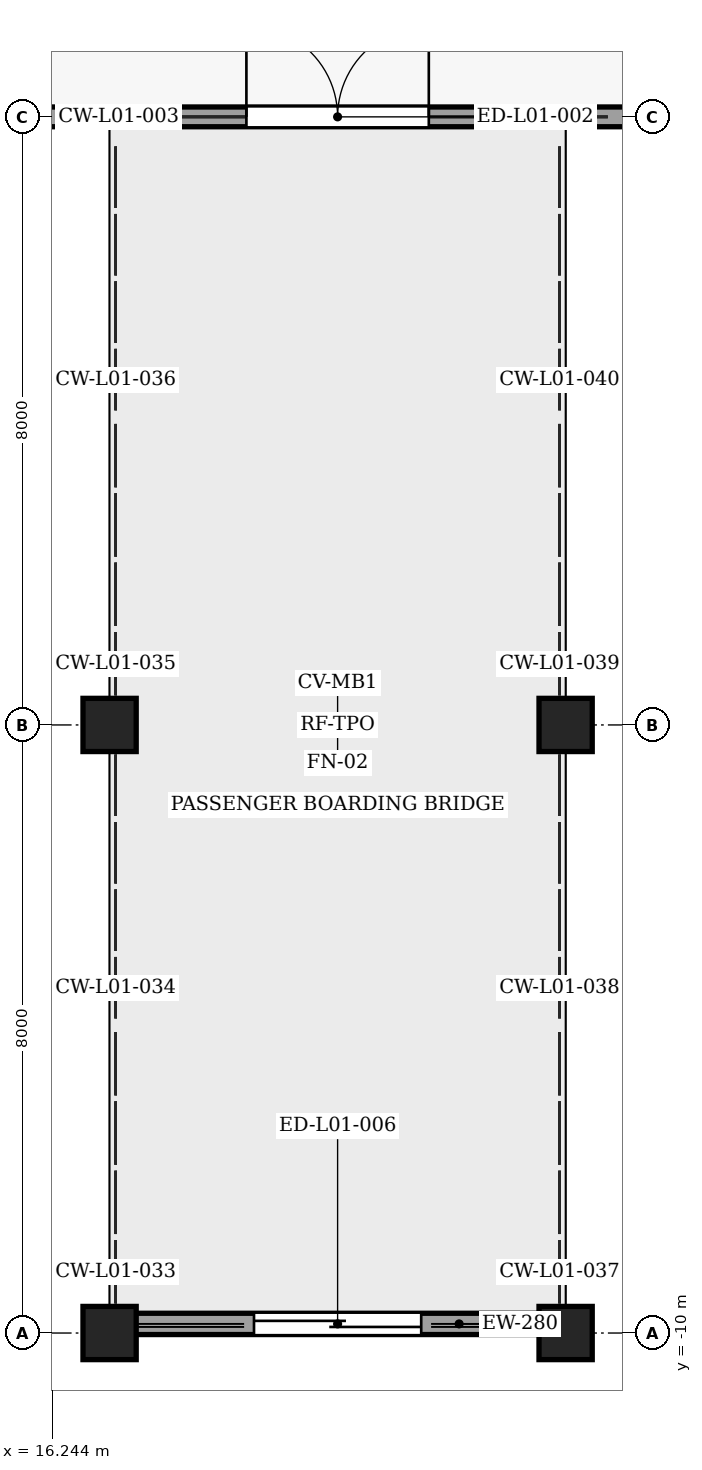
"""IFC4 building model, lengths in metres.
Left out: names, types, materials, properties, quantities, classifications, styles, units other than length and angle.
Written with IfcOpenShell. Run it as: python <this file> out.ifc"""

import sys

from ifc_helpers import new_model, si_unit, direction, frame, frame_2d, origin, origin_2d, place, context, subcontext, project, spatial, rectangle, extrude, element, fill, save


model = new_model("IFC4")
c1 = context("Model", 3, precision=1e-05, world=origin(), true_north=direction((0.0, 1.0)))
c2 = subcontext(c1, "Body", "Model", "MODEL_VIEW")
j1 = project(units=[si_unit("LENGTHUNIT", "METRE"), si_unit("PLANEANGLEUNIT", "RADIAN")], contexts=[c1])
p1 = place(None, origin())
s1 = spatial("IfcSite", under=j1, at=p1, CompositionType="ELEMENT")
p2 = place(p1, origin())
s2 = spatial("IfcBuilding", under=s1, at=p2, CompositionType="ELEMENT")
p3 = place(p2, origin())
s3 = spatial("IfcBuildingStorey", under=s2, at=p3, CompositionType="ELEMENT", Elevation=0.0)
for number, where, z_axis, x_axis in (
    (1, (17.0, -10.0, -0.45), (0.0, 0.0, 1.0), (1.0, 0.0, 0.0)),
    (2, (23.0, -10.0, -0.45), (0.0, 0.0, 1.0), (1.0, 0.0, 0.0)),
    (3, (17.0, -2.0, -0.45), (0.0, 0.0, 1.0), (1.0, 0.0, 0.0)),
    (4, (23.0, -2.0, -0.45), (0.0, 0.0, 1.0), (1.0, 0.0, 0.0)),
):
    element("IfcColumn", number, at=place(p3, frame(where, z_axis=z_axis, x_axis=x_axis)), inside=s3, PredefinedType="COLUMN", context=c2, shape_type="SweptSolid", body=[
        extrude(rectangle(XDim=0.7, YDim=0.7, at=origin_2d()), origin(), (0.0, 0.0, 1.0), 4.58),
    ])
p4 = place(p3, frame((16.172, 6.0, 0.0), z_axis=(0.0, 0.0, 1.0), x_axis=(1.0, 0.0, 0.0)))
e5 = element("IfcWall", 5, at=p4, inside=s3, PredefinedType="SOLIDWALL", context=c2, shape_type="SweptSolid", body=[
    extrude(rectangle(XDim=7.657, YDim=0.26, at=frame_2d((3.829, 0.0))), origin(), (0.0, 0.0, 1.0), 3.435),
])
p5 = place(p4, frame((2.628, 0.0, 0.0)))
e6 = element("IfcOpeningElement", 6, at=p5, cuts=e5, PredefinedType="OPENING", context=c2, shape_type="SweptSolid", body=[
    extrude(rectangle(XDim=2.4, YDim=2.4, at=frame_2d((1.2, 1.2))), frame((0.0, 0.14, 0.0), z_axis=(0.0, -1.0, 0.0), x_axis=(1.0, 0.0, 0.0)), (0.0, 0.0, 1.0), 0.28),
])
p6 = place(p3, frame((17.335, -9.88, 0.0), z_axis=(0.0, 0.0, 1.0), x_axis=(1.0, 0.0, 0.0)))
e7 = element("IfcWall", 7, at=p6, inside=s3, PredefinedType="SOLIDWALL", context=c2, shape_type="SweptSolid", body=[
    extrude(rectangle(XDim=5.33, YDim=0.28, at=frame_2d((2.665, 0.0))), origin(), (0.0, 0.0, 1.0), 3.772),
])
p7 = place(p6, frame((1.565, 0.0, 0.0)))
e8 = element("IfcOpeningElement", 8, at=p7, cuts=e7, PredefinedType="OPENING", context=c2, shape_type="SweptSolid", body=[
    extrude(rectangle(XDim=2.2, YDim=2.35, at=frame_2d((1.1, 1.175))), frame((0.0, 0.15, 0.0), z_axis=(0.0, -1.0, 0.0), x_axis=(1.0, 0.0, 0.0)), (0.0, 0.0, 1.0), 0.3),
])
p8 = place(p5, origin())
e9 = element("IfcDoor", 9, at=p8, inside=s3, OperationType="DOUBLE_DOOR_SINGLE_SWING", PredefinedType="DOOR", context=c2, shape_type="SweptSolid", body=[
    extrude(rectangle(XDim=2.4, YDim=2.4, at=frame_2d((1.2, 1.2))), frame((0.0, 0.025, 0.0), z_axis=(0.0, -1.0, 0.0), x_axis=(1.0, 0.0, 0.0)), (0.0, 0.0, 1.0), 0.05),
])
fill(e6, e9)
p9 = place(p7, origin())
e10 = element("IfcDoor", 10, at=p9, inside=s3, OperationType="SLIDING_TO_LEFT", PredefinedType="DOOR", context=c2, shape_type="SweptSolid", body=[
    extrude(rectangle(XDim=2.2, YDim=2.35, at=frame_2d((1.1, 1.175))), frame((0.0, 0.025, 0.0), z_axis=(0.0, -1.0, 0.0), x_axis=(1.0, 0.0, 0.0)), (0.0, 0.0, 1.0), 0.05),
])
fill(e8, e10)
save(model, sys.argv[1])
